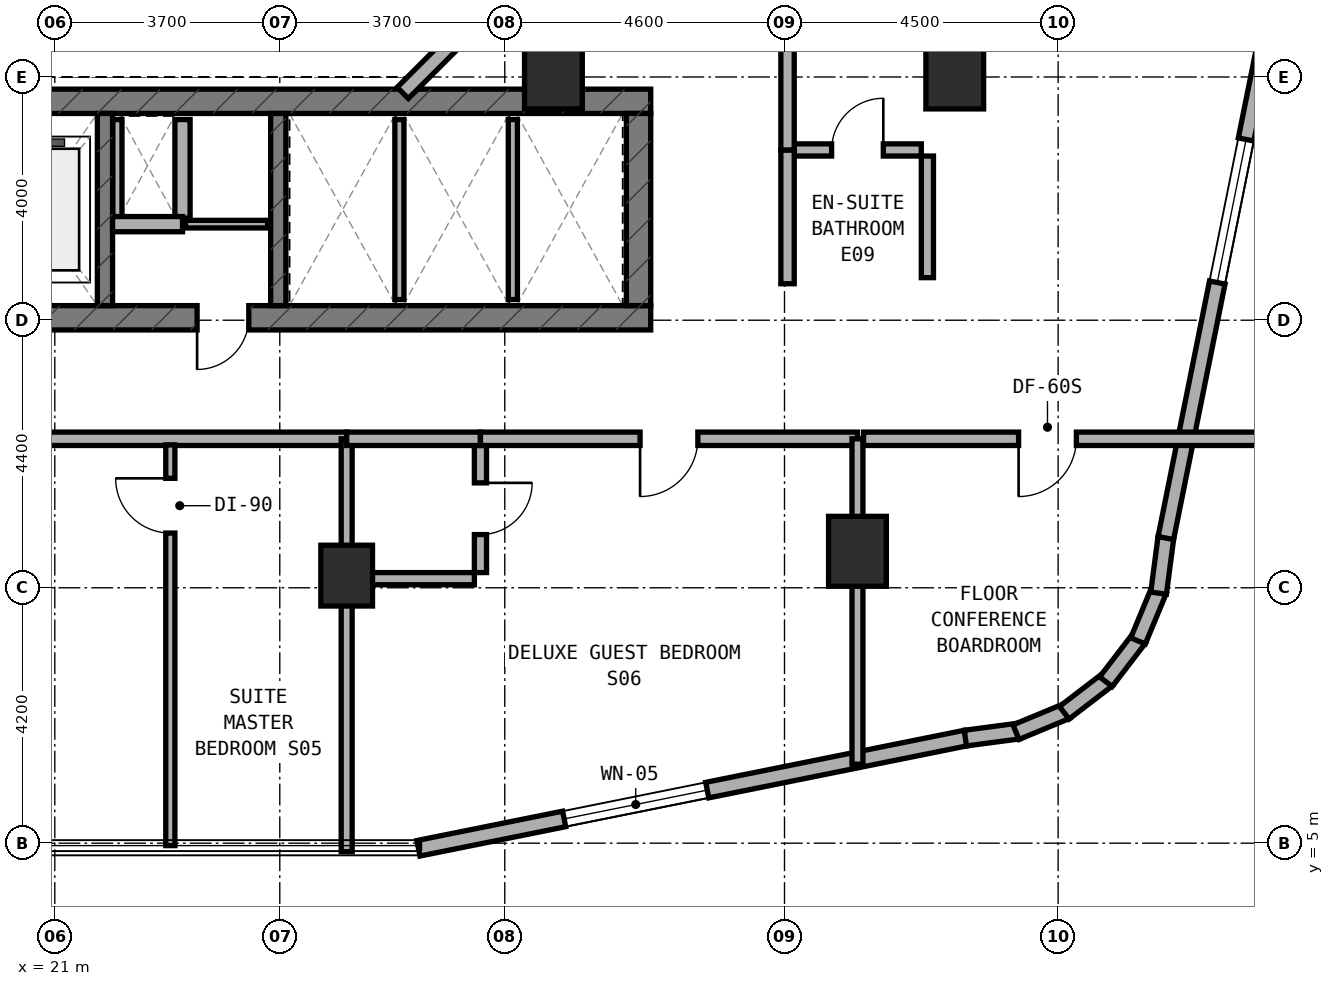
"""IFC4 building model, lengths in metres.
Left out: names, types, materials, properties, quantities, classifications, styles, units other than length and angle.
Written with IfcOpenShell. Run it as: python <this file> out.ifc"""

import sys

from ifc_helpers import new_model, si_unit, direction, frame, frame_2d, origin, origin_2d, place, context, subcontext, project, spatial, rectangle, extrude, element, fill, save


model = new_model("IFC4")
c1 = context("Model", 3, precision=1e-05, world=origin(), true_north=direction((0.0, 1.0)))
c2 = subcontext(c1, "Body", "Model", "MODEL_VIEW")
j1 = project(units=[si_unit("LENGTHUNIT", "METRE"), si_unit("PLANEANGLEUNIT", "RADIAN")], contexts=[c1])
p1 = place(None, origin())
s1 = spatial("IfcSite", under=j1, at=p1, CompositionType="ELEMENT")
p2 = place(p1, origin())
s2 = spatial("IfcBuilding", under=s1, at=p2, CompositionType="ELEMENT")
p3 = place(p2, frame((0.0, 0.0, 116.0)))
s3 = spatial("IfcBuildingStorey", under=s2, at=p3, CompositionType="ELEMENT", Elevation=116.0)
p4 = place(p3, frame((6.4, 13.64, 0.0), z_axis=(0.0, 0.0, 1.0), x_axis=(1.0, 0.0, 0.0)))
e1 = element("IfcWall", 1, at=p4, inside=s3, PredefinedType="SHEAR", context=c2, shape_type="SweptSolid", body=[
    extrude(rectangle(XDim=24.4, YDim=0.4, at=frame_2d((12.2, 0.0))), origin(), (0.0, 0.0, 1.0), 3.5),
])
p5 = place(p4, frame((9.15, 0.0, 0.0)))
e2 = element("IfcOpeningElement", 2, at=p5, cuts=e1, PredefinedType="OPENING", context=c2, shape_type="SweptSolid", body=[
    extrude(rectangle(XDim=1.2, YDim=2.15, at=frame_2d((0.6, 1.075))), frame((0.0, 0.21, 0.0), z_axis=(0.0, -1.0, 0.0), x_axis=(1.0, 0.0, 0.0)), (0.0, 0.0, 1.0), 0.42),
])
p6 = place(p4, frame((16.94, 0.0, 0.0)))
e3 = element("IfcOpeningElement", 3, at=p6, cuts=e1, PredefinedType="OPENING", context=c2, shape_type="SweptSolid", body=[
    extrude(rectangle(XDim=0.85, YDim=2.1, at=frame_2d((0.425, 1.05))), frame((0.0, 0.21, 0.0), z_axis=(0.0, -1.0, 0.0), x_axis=(1.0, 0.0, 0.0)), (0.0, 0.0, 1.0), 0.42),
])
p7 = place(p3, frame((6.4, 17.2, 0.0), z_axis=(0.0, 0.0, 1.0), x_axis=(1.0, 0.0, 0.0)))
e4 = element("IfcWall", 4, at=p7, inside=s3, PredefinedType="SHEAR", context=c2, shape_type="SweptSolid", body=[
    extrude(rectangle(XDim=24.4, YDim=0.4, at=frame_2d((12.2, 0.0))), origin(), (0.0, 0.0, 1.0), 3.5),
])
p8 = place(p3, frame((30.6, 13.84, 0.0), z_axis=(0.0, 0.0, 1.0), x_axis=(0.0, 1.0, 0.0)))
e5 = element("IfcWall", 5, at=p8, inside=s3, PredefinedType="SHEAR", context=c2, shape_type="SweptSolid", body=[
    extrude(rectangle(XDim=3.16, YDim=0.4, at=frame_2d((1.58, 0.0))), origin(), (0.0, 0.0, 1.0), 3.5),
])
for number, where, z_axis, x_axis in (
    (6, (21.825, 13.84, 0.0), (0.0, 0.0, 1.0), (0.0, 1.0, 0.0)),
    (7, (24.675, 13.84, 0.0), (0.0, 0.0, 1.0), (0.0, 1.0, 0.0)),
):
    element("IfcWall", number, at=place(p3, frame(where, z_axis=z_axis, x_axis=x_axis)), inside=s3, PredefinedType="STANDARD", context=c2, shape_type="SweptSolid", body=[
        extrude(rectangle(XDim=3.16, YDim=0.25, at=frame_2d((1.58, 0.0))), origin(), (0.0, 0.0, 1.0), 3.18),
    ])
p9 = place(p3, frame((25.8, 9.4, 0.0), z_axis=(0.0, 0.0, 1.0), x_axis=(1.0, 0.0, 0.0)))
e8 = element("IfcColumn", 8, at=p9, inside=s3, PredefinedType="COLUMN", context=c2, shape_type="SweptSolid", body=[
    extrude(rectangle(XDim=0.85, YDim=1.0, at=origin_2d()), origin(), (0.0, 0.0, 1.0), 3.5),
])
for number, where, z_axis, x_axis in (
    (9, (34.2, 9.8, 0.0), (0.0, 0.0, 1.0), (1.0, 0.0, 0.0)),
    (10, (35.8, 17.65, 0.0), (0.0, 0.0, 1.0), (1.0, 0.0, 0.0)),
    (11, (29.2, 17.65, 0.0), (0.0, 0.0, 1.0), (1.0, 0.0, 0.0)),
):
    element("IfcColumn", number, at=place(p3, frame(where, z_axis=z_axis, x_axis=x_axis)), inside=s3, PredefinedType="COLUMN", context=c2, shape_type="SweptSolid", body=[
        extrude(rectangle(XDim=0.95, YDim=1.15, at=origin_2d()), origin(), (0.0, 0.0, 1.0), 3.5),
    ])
p10 = place(p3, frame((26.98, 4.916, 0.0), z_axis=(0.0, 0.0, 1.0), x_axis=(0.980315963543, 0.197435082048, 0.0)))
e12 = element("IfcWall", 12, at=p10, inside=s3, PredefinedType="STANDARD", context=c2, shape_type="SweptSolid", body=[
    extrude(rectangle(XDim=9.183, YDim=0.26, at=frame_2d((4.591, 0.0))), origin(), (0.0, 0.0, 1.0), 3.18),
])
p11 = place(p10, frame((2.445, 0.0, 0.8)))
e13 = element("IfcOpeningElement", 13, at=p11, cuts=e12, PredefinedType="OPENING", context=c2, shape_type="SweptSolid", body=[
    extrude(rectangle(XDim=2.4, YDim=1.6, at=frame_2d((1.2, 0.8))), frame((0.0, 0.14, 0.0), z_axis=(0.0, -1.0, 0.0), x_axis=(1.0, 0.0, 0.0)), (0.0, 0.0, 1.0), 0.28),
])
p12 = place(p3, frame((35.975, 6.728, 0.0), z_axis=(0.0, 0.0, 1.0), x_axis=(0.991388484223, 0.130953706898, 0.0)))
e14 = element("IfcWall", 14, at=p12, inside=s3, PredefinedType="STANDARD", context=c2, shape_type="SweptSolid", body=[
    extrude(rectangle(XDim=0.885, YDim=0.26, at=frame_2d((0.443, 0.0))), origin(), (0.0, 0.0, 1.0), 3.18),
])
p13 = place(p3, frame((36.807, 6.826, 0.0), z_axis=(0.0, 0.0, 1.0), x_axis=(0.923627776508, 0.383290660547, 0.0)))
e15 = element("IfcWall", 15, at=p13, inside=s3, PredefinedType="STANDARD", context=c2, shape_type="SweptSolid", body=[
    extrude(rectangle(XDim=0.903, YDim=0.26, at=frame_2d((0.452, 0.0))), origin(), (0.0, 0.0, 1.0), 3.18),
])
p14 = place(p3, frame((37.601, 7.144, 0.0), z_axis=(0.0, 0.0, 1.0), x_axis=(0.793458244748, 0.608624690463, 0.0)))
e16 = element("IfcWall", 16, at=p14, inside=s3, PredefinedType="STANDARD", context=c2, shape_type="SweptSolid", body=[
    extrude(rectangle(XDim=0.902, YDim=0.26, at=frame_2d((0.451, 0.0))), origin(), (0.0, 0.0, 1.0), 3.18),
])
p15 = place(p3, frame((38.286, 7.655, 0.0), z_axis=(0.0, 0.0, 1.0), x_axis=(0.608494022858, 0.793558456666, 0.0)))
e17 = element("IfcWall", 17, at=p15, inside=s3, PredefinedType="STANDARD", context=c2, shape_type="SweptSolid", body=[
    extrude(rectangle(XDim=0.902, YDim=0.26, at=frame_2d((0.451, 0.0))), origin(), (0.0, 0.0, 1.0), 3.18),
])
p16 = place(p3, frame((38.814, 8.327, 0.0), z_axis=(0.0, 0.0, 1.0), x_axis=(0.383155708213, 0.923683767999, 0.0)))
e18 = element("IfcWall", 18, at=p16, inside=s3, PredefinedType="STANDARD", context=c2, shape_type="SweptSolid", body=[
    extrude(rectangle(XDim=0.903, YDim=0.26, at=frame_2d((0.451, 0.0))), origin(), (0.0, 0.0, 1.0), 3.18),
])
p17 = place(p3, frame((39.152, 9.112, 0.0), z_axis=(0.0, 0.0, 1.0), x_axis=(0.130200706103, 0.991487658083, 0.0)))
e19 = element("IfcWall", 19, at=p17, inside=s3, PredefinedType="STANDARD", context=c2, shape_type="SweptSolid", body=[
    extrude(rectangle(XDim=0.921, YDim=0.26, at=frame_2d((0.46, 0.0))), origin(), (0.0, 0.0, 1.0), 3.18),
])
p18 = place(p3, frame((39.271, 10.018, 0.0), z_axis=(0.0, 0.0, 1.0), x_axis=(0.197435082048, 0.980315963543, 0.0)))
e20 = element("IfcWall", 20, at=p18, inside=s3, PredefinedType="STANDARD", context=c2, shape_type="SweptSolid", body=[
    extrude(rectangle(XDim=9.183, YDim=0.26, at=frame_2d((4.591, 0.0))), origin(), (0.0, 0.0, 1.0), 3.18),
])
p19 = place(p18, frame((4.286, 0.0, 0.8)))
e21 = element("IfcOpeningElement", 21, at=p19, cuts=e20, PredefinedType="OPENING", context=c2, shape_type="SweptSolid", body=[
    extrude(rectangle(XDim=2.4, YDim=1.6, at=frame_2d((1.2, 0.8))), frame((0.0, 0.14, 0.0), z_axis=(0.0, -1.0, 0.0), x_axis=(1.0, 0.0, 0.0)), (0.0, 0.0, 1.0), 0.28),
])
p20 = place(p3, frame((26.722, 17.338, 0.0), z_axis=(0.0, 0.0, 1.0), x_axis=(0.707059717605, 0.707153841636, 0.0)))
e22 = element("IfcWall", 22, at=p20, inside=s3, PredefinedType="STANDARD", context=c2, shape_type="SweptSolid", body=[
    extrude(rectangle(XDim=2.594, YDim=0.26, at=frame_2d((1.297, 0.0))), origin(), (0.0, 0.0, 1.0), 3.18),
])
p21 = place(p3, frame((22.03, 15.28, 0.0), z_axis=(0.0, 0.0, 1.0), x_axis=(0.0, 1.0, 0.0)))
e23 = element("IfcWall", 23, at=p21, inside=s3, PredefinedType="PARTITIONING", context=c2, shape_type="SweptSolid", body=[
    extrude(rectangle(XDim=1.62, YDim=0.15, at=frame_2d((0.81, 0.0))), origin(), (0.0, 0.0, 1.0), 3.18),
])
p22 = place(p3, frame((23.1, 15.28, 0.0), z_axis=(0.0, 0.0, 1.0), x_axis=(0.0, 1.0, 0.0)))
e24 = element("IfcWall", 24, at=p22, inside=s3, PredefinedType="SOLIDWALL", context=c2, shape_type="SweptSolid", body=[
    extrude(rectangle(XDim=1.62, YDim=0.25, at=frame_2d((0.81, 0.0))), origin(), (0.0, 0.0, 1.0), 3.18),
])
p23 = place(p3, frame((21.95, 15.18, 0.0), z_axis=(0.0, 0.0, 1.0), x_axis=(1.0, 0.0, 0.0)))
e25 = element("IfcWall", 25, at=p23, inside=s3, PredefinedType="SOLIDWALL", context=c2, shape_type="SweptSolid", body=[
    extrude(rectangle(XDim=1.15, YDim=0.25, at=frame_2d((0.575, 0.0))), origin(), (0.0, 0.0, 1.0), 3.18),
])
p24 = place(p3, frame((23.15, 15.18, 0.0), z_axis=(0.0, 0.0, 1.0), x_axis=(1.0, 0.0, 0.0)))
e26 = element("IfcWall", 26, at=p24, inside=s3, PredefinedType="PARTITIONING", context=c2, shape_type="SweptSolid", body=[
    extrude(rectangle(XDim=1.35, YDim=0.125, at=frame_2d((0.675, 0.0))), origin(), (0.0, 0.0, 1.0), 3.18),
])
p25 = place(p3, frame((26.667, 13.94, 0.0), z_axis=(0.0, 0.0, 1.0), x_axis=(0.0, 1.0, 0.0)))
e27 = element("IfcWall", 27, at=p25, inside=s3, PredefinedType="PARTITIONING", context=c2, shape_type="SweptSolid", body=[
    extrude(rectangle(XDim=2.96, YDim=0.15, at=frame_2d((1.48, 0.0))), origin(), (0.0, 0.0, 1.0), 3.18),
])
p26 = place(p3, frame((28.533, 13.94, 0.0), z_axis=(0.0, 0.0, 1.0), x_axis=(0.0, 1.0, 0.0)))
e28 = element("IfcWall", 28, at=p26, inside=s3, PredefinedType="PARTITIONING", context=c2, shape_type="SweptSolid", body=[
    extrude(rectangle(XDim=2.96, YDim=0.15, at=frame_2d((1.48, 0.0))), origin(), (0.0, 0.0, 1.0), 2.655),
])
p27 = place(p3, frame((14.0, 11.65, 0.0), z_axis=(0.0, 0.0, 1.0), x_axis=(1.0, 0.0, 0.0)))
e29 = element("IfcWall", 29, at=p27, inside=s3, PredefinedType="SOLIDWALL", context=c2, shape_type="SweptSolid", body=[
    extrude(rectangle(XDim=11.8, YDim=0.22, at=frame_2d((5.9, 0.0))), origin(), (0.0, 0.0, 1.0), 2.655),
])
p28 = place(p27, frame((5.425, 0.0, 0.0)))
e30 = element("IfcOpeningElement", 30, at=p28, cuts=e29, PredefinedType="OPENING", context=c2, shape_type="SweptSolid", body=[
    extrude(rectangle(XDim=0.95, YDim=2.1, at=frame_2d((0.475, 1.05))), frame((0.0, 0.12, 0.0), z_axis=(0.0, -1.0, 0.0), x_axis=(1.0, 0.0, 0.0)), (0.0, 0.0, 1.0), 0.24),
])
p29 = place(p3, frame((22.9, 4.96, 0.0), z_axis=(0.0, 0.0, 1.0), x_axis=(0.0, 1.0, 0.0)))
e31 = element("IfcWall", 31, at=p29, inside=s3, PredefinedType="PARTITIONING", context=c2, shape_type="SweptSolid", body=[
    extrude(rectangle(XDim=6.59, YDim=0.15, at=frame_2d((3.295, 0.0))), origin(), (0.0, 0.0, 1.0), 2.795),
])
p30 = place(p29, frame((5.14, 0.0, 0.0)))
e32 = element("IfcOpeningElement", 32, at=p30, cuts=e31, PredefinedType="OPENING", context=c2, shape_type="SweptSolid", body=[
    extrude(rectangle(XDim=0.9, YDim=2.1, at=frame_2d((0.45, 1.05))), frame((0.0, 0.085, 0.0), z_axis=(0.0, -1.0, 0.0), x_axis=(1.0, 0.0, 0.0)), (0.0, 0.0, 1.0), 0.17),
])
p31 = place(p3, frame((25.8, 4.86, 0.0), z_axis=(0.0, 0.0, 1.0), x_axis=(0.0, 1.0, 0.0)))
e33 = element("IfcWall", 33, at=p31, inside=s3, PredefinedType="SOLIDWALL", context=c2, shape_type="SweptSolid", body=[
    extrude(rectangle(XDim=6.79, YDim=0.18, at=frame_2d((3.395, 0.0))), origin(), (0.0, 0.0, 1.0), 2.655),
])
p32 = place(p3, frame((28.0, 9.45, 0.0), z_axis=(0.0, 0.0, 1.0), x_axis=(0.0, 1.0, 0.0)))
e34 = element("IfcWall", 34, at=p32, inside=s3, PredefinedType="PLUMBINGWALL", context=c2, shape_type="SweptSolid", body=[
    extrude(rectangle(XDim=2.1, YDim=0.2, at=frame_2d((1.05, 0.0))), origin(), (0.0, 0.0, 1.0), 2.795),
])
p33 = place(p32, frame((0.625, 0.0, 0.0)))
e35 = element("IfcOpeningElement", 35, at=p33, cuts=e34, PredefinedType="OPENING", context=c2, shape_type="SweptSolid", body=[
    extrude(rectangle(XDim=0.85, YDim=2.1, at=frame_2d((0.425, 1.05))), frame((0.0, 0.11, 0.0), z_axis=(0.0, -1.0, 0.0), x_axis=(1.0, 0.0, 0.0)), (0.0, 0.0, 1.0), 0.22),
])
p34 = place(p3, frame((25.9, 9.35, 0.0), z_axis=(0.0, 0.0, 1.0), x_axis=(1.0, 0.0, 0.0)))
e36 = element("IfcWall", 36, at=p34, inside=s3, PredefinedType="PLUMBINGWALL", context=c2, shape_type="SweptSolid", body=[
    extrude(rectangle(XDim=2.0, YDim=0.2, at=frame_2d((1.0, 0.0))), origin(), (0.0, 0.0, 1.0), 2.795),
])
p35 = place(p3, frame((25.8, 11.65, 0.0), z_axis=(0.0, 0.0, 1.0), x_axis=(1.0, 0.0, 0.0)))
e37 = element("IfcWall", 37, at=p35, inside=s3, PredefinedType="SOLIDWALL", context=c2, shape_type="SweptSolid", body=[
    extrude(rectangle(XDim=2.2, YDim=0.22, at=frame_2d((1.1, 0.0))), origin(), (0.0, 0.0, 1.0), 2.655),
])
p36 = place(p3, frame((28.0, 11.65, 0.0), z_axis=(0.0, 0.0, 1.0), x_axis=(1.0, 0.0, 0.0)))
e38 = element("IfcWall", 38, at=p36, inside=s3, PredefinedType="SOLIDWALL", context=c2, shape_type="SweptSolid", body=[
    extrude(rectangle(XDim=6.2, YDim=0.22, at=frame_2d((3.1, 0.0))), origin(), (0.0, 0.0, 1.0), 2.655),
])
p37 = place(p36, frame((2.625, 0.0, 0.0)))
e39 = element("IfcOpeningElement", 39, at=p37, cuts=e38, PredefinedType="OPENING", context=c2, shape_type="SweptSolid", body=[
    extrude(rectangle(XDim=0.95, YDim=2.1, at=frame_2d((0.475, 1.05))), frame((0.0, 0.12, 0.0), z_axis=(0.0, -1.0, 0.0), x_axis=(1.0, 0.0, 0.0)), (0.0, 0.0, 1.0), 0.24),
])
p38 = place(p3, frame((34.2, 6.299, 0.0), z_axis=(0.0, 0.0, 1.0), x_axis=(0.0, 1.0, 0.0)))
e40 = element("IfcWall", 40, at=p38, inside=s3, PredefinedType="SOLIDWALL", context=c2, shape_type="SweptSolid", body=[
    extrude(rectangle(XDim=5.351, YDim=0.18, at=frame_2d((2.675, 0.0))), origin(), (0.0, 0.0, 1.0), 2.655),
])
p39 = place(p3, frame((34.3, 11.65, 0.0), z_axis=(0.0, 0.0, 1.0), x_axis=(1.0, 0.0, 0.0)))
e41 = element("IfcWall", 41, at=p39, inside=s3, PredefinedType="SOLIDWALL", context=c2, shape_type="SweptSolid", body=[
    extrude(rectangle(XDim=6.64, YDim=0.22, at=frame_2d((3.32, 0.0))), origin(), (0.0, 0.0, 1.0), 2.795),
])
p40 = place(p39, frame((2.55, 0.0, 0.0)))
e42 = element("IfcOpeningElement", 42, at=p40, cuts=e41, PredefinedType="OPENING", context=c2, shape_type="SweptSolid", body=[
    extrude(rectangle(XDim=0.95, YDim=2.1, at=frame_2d((0.475, 1.05))), frame((0.0, 0.12, 0.0), z_axis=(0.0, -1.0, 0.0), x_axis=(1.0, 0.0, 0.0)), (0.0, 0.0, 1.0), 0.24),
])
p41 = place(p3, frame((33.15, 16.4, 0.0), z_axis=(0.0, 0.0, 1.0), x_axis=(1.0, 0.0, 0.0)))
e43 = element("IfcWall", 43, at=p41, inside=s3, PredefinedType="PLUMBINGWALL", context=c2, shape_type="SweptSolid", body=[
    extrude(rectangle(XDim=2.1, YDim=0.2, at=frame_2d((1.05, 0.0))), origin(), (0.0, 0.0, 1.0), 3.18),
])
p42 = place(p41, frame((0.625, 0.0, 0.0)))
e44 = element("IfcOpeningElement", 44, at=p42, cuts=e43, PredefinedType="OPENING", context=c2, shape_type="SweptSolid", body=[
    extrude(rectangle(XDim=0.85, YDim=2.1, at=frame_2d((0.425, 1.05))), frame((0.0, 0.11, 0.0), z_axis=(0.0, -1.0, 0.0), x_axis=(1.0, 0.0, 0.0)), (0.0, 0.0, 1.0), 0.22),
])
p43 = place(p3, frame((35.35, 14.3, 0.0), z_axis=(0.0, 0.0, 1.0), x_axis=(0.0, 1.0, 0.0)))
e45 = element("IfcWall", 45, at=p43, inside=s3, PredefinedType="PLUMBINGWALL", context=c2, shape_type="SweptSolid", body=[
    extrude(rectangle(XDim=2.0, YDim=0.2, at=frame_2d((1.0, 0.0))), origin(), (0.0, 0.0, 1.0), 2.795),
])
p44 = place(p3, frame((33.05, 14.2, 0.0), z_axis=(0.0, 0.0, 1.0), x_axis=(0.0, 1.0, 0.0)))
e46 = element("IfcWall", 46, at=p44, inside=s3, PredefinedType="SOLIDWALL", context=c2, shape_type="SweptSolid", body=[
    extrude(rectangle(XDim=2.2, YDim=0.22, at=frame_2d((1.1, 0.0))), origin(), (0.0, 0.0, 1.0), 3.18),
])
p45 = place(p3, frame((33.05, 16.4, 0.0), z_axis=(0.0, 0.0, 1.0), x_axis=(0.0, 1.0, 0.0)))
e47 = element("IfcWall", 47, at=p45, inside=s3, PredefinedType="SOLIDWALL", context=c2, shape_type="SweptSolid", body=[
    extrude(rectangle(XDim=6.134, YDim=0.22, at=frame_2d((3.067, 0.0))), origin(), (0.0, 0.0, 1.0), 2.655),
])
p46 = place(p45, frame((2.592, 0.0, 0.0)))
e48 = element("IfcOpeningElement", 48, at=p46, cuts=e47, PredefinedType="OPENING", context=c2, shape_type="SweptSolid", body=[
    extrude(rectangle(XDim=0.95, YDim=2.1, at=frame_2d((0.475, 1.05))), frame((0.0, 0.12, 0.0), z_axis=(0.0, -1.0, 0.0), x_axis=(1.0, 0.0, 0.0)), (0.0, 0.0, 1.0), 0.24),
])
p47 = place(p11, origin())
e49 = element("IfcWindow", 49, at=p47, inside=s3, PartitioningType="SINGLE_PANEL", PredefinedType="WINDOW", context=c2, shape_type="SweptSolid", body=[
    extrude(rectangle(XDim=2.4, YDim=1.6, at=frame_2d((1.2, 0.8))), frame((0.0, 0.03, 0.0), z_axis=(0.0, -1.0, 0.0), x_axis=(1.0, 0.0, 0.0)), (0.0, 0.0, 1.0), 0.06),
])
fill(e13, e49)
p48 = place(p19, origin())
e50 = element("IfcWindow", 50, at=p48, inside=s3, PartitioningType="SINGLE_PANEL", PredefinedType="WINDOW", context=c2, shape_type="SweptSolid", body=[
    extrude(rectangle(XDim=2.4, YDim=1.6, at=frame_2d((1.2, 0.8))), frame((0.0, 0.03, 0.0), z_axis=(0.0, -1.0, 0.0), x_axis=(1.0, 0.0, 0.0)), (0.0, 0.0, 1.0), 0.06),
])
fill(e21, e50)
p49 = place(p6, frame((0.85, 0.0, 0.0), z_axis=(0.0, 0.0, 1.0), x_axis=(-1.0, 0.0, 0.0)))
e51 = element("IfcDoor", 51, at=p49, inside=s3, OperationType="SINGLE_SWING_RIGHT", PredefinedType="DOOR", context=c2, shape_type="SweptSolid", body=[
    extrude(rectangle(XDim=0.85, YDim=2.1, at=frame_2d((0.425, 1.05))), frame((0.0, 0.025, 0.0), z_axis=(0.0, -1.0, 0.0), x_axis=(1.0, 0.0, 0.0)), (0.0, 0.0, 1.0), 0.05),
])
fill(e3, e51)
p50 = place(p30, origin())
e52 = element("IfcDoor", 52, at=p50, inside=s3, OperationType="SINGLE_SWING_RIGHT", PredefinedType="DOOR", context=c2, shape_type="SweptSolid", body=[
    extrude(rectangle(XDim=0.9, YDim=2.1, at=frame_2d((0.45, 1.05))), frame((0.0, 0.025, 0.0), z_axis=(0.0, -1.0, 0.0), x_axis=(1.0, 0.0, 0.0)), (0.0, 0.0, 1.0), 0.05),
])
fill(e32, e52)
p51 = place(p33, frame((0.85, 0.0, 0.0), z_axis=(0.0, 0.0, 1.0), x_axis=(-1.0, 0.0, 0.0)))
e53 = element("IfcDoor", 53, at=p51, inside=s3, OperationType="SINGLE_SWING_LEFT", PredefinedType="DOOR", context=c2, shape_type="SweptSolid", body=[
    extrude(rectangle(XDim=0.85, YDim=2.1, at=frame_2d((0.425, 1.05))), frame((0.0, 0.025, 0.0), z_axis=(0.0, -1.0, 0.0), x_axis=(1.0, 0.0, 0.0)), (0.0, 0.0, 1.0), 0.05),
])
fill(e35, e53)
p52 = place(p37, frame((0.95, 0.0, 0.0), z_axis=(0.0, 0.0, 1.0), x_axis=(-1.0, 0.0, 0.0)))
e54 = element("IfcDoor", 54, at=p52, inside=s3, OperationType="SINGLE_SWING_RIGHT", PredefinedType="DOOR", context=c2, shape_type="SweptSolid", body=[
    extrude(rectangle(XDim=0.95, YDim=2.1, at=frame_2d((0.475, 1.05))), frame((0.0, 0.025, 0.0), z_axis=(0.0, -1.0, 0.0), x_axis=(1.0, 0.0, 0.0)), (0.0, 0.0, 1.0), 0.05),
])
fill(e39, e54)
p53 = place(p40, frame((0.95, 0.0, 0.0), z_axis=(0.0, 0.0, 1.0), x_axis=(-1.0, 0.0, 0.0)))
e55 = element("IfcDoor", 55, at=p53, inside=s3, OperationType="SINGLE_SWING_RIGHT", PredefinedType="DOOR", context=c2, shape_type="SweptSolid", body=[
    extrude(rectangle(XDim=0.95, YDim=2.1, at=frame_2d((0.475, 1.05))), frame((0.0, 0.025, 0.0), z_axis=(0.0, -1.0, 0.0), x_axis=(1.0, 0.0, 0.0)), (0.0, 0.0, 1.0), 0.05),
])
fill(e42, e55)
p54 = place(p42, origin())
e56 = element("IfcDoor", 56, at=p54, inside=s3, OperationType="SINGLE_SWING_RIGHT", PredefinedType="DOOR", context=c2, shape_type="SweptSolid", body=[
    extrude(rectangle(XDim=0.85, YDim=2.1, at=frame_2d((0.425, 1.05))), frame((0.0, 0.025, 0.0), z_axis=(0.0, -1.0, 0.0), x_axis=(1.0, 0.0, 0.0)), (0.0, 0.0, 1.0), 0.05),
])
fill(e44, e56)
save(model, sys.argv[1])
